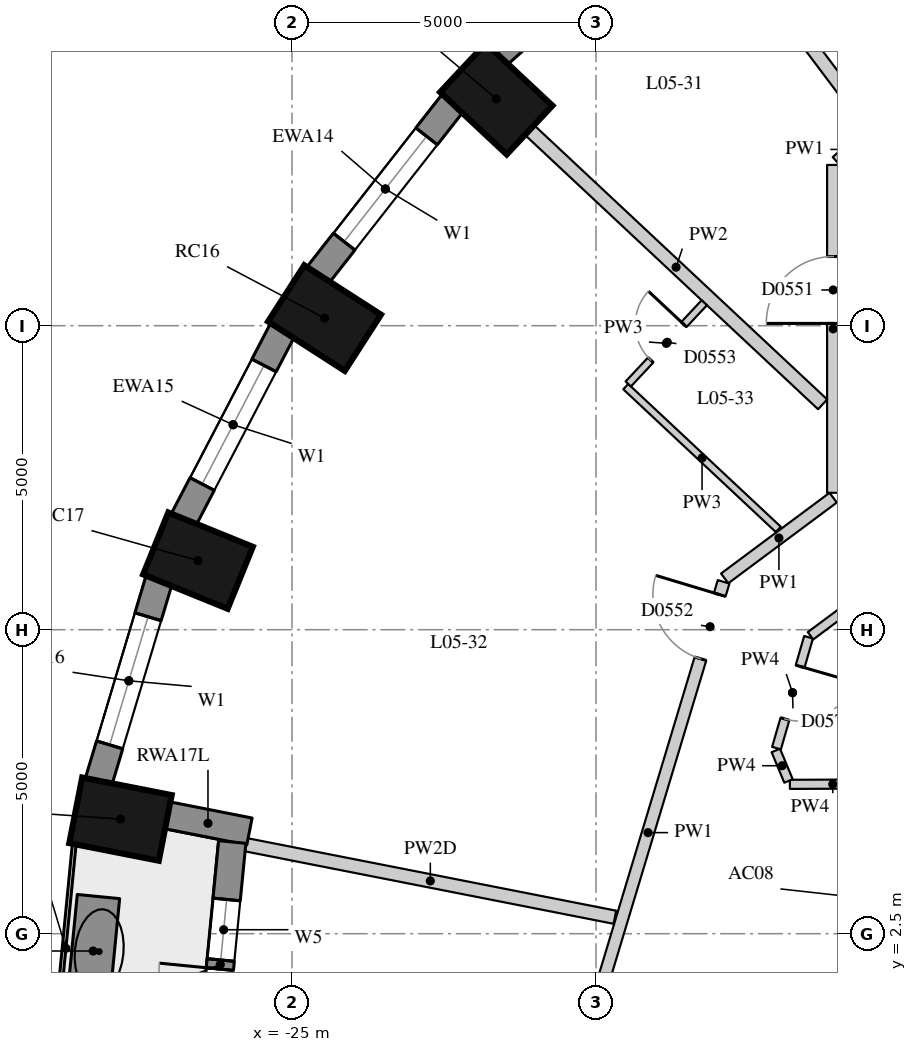
"""IFC4 building model, lengths in metres.
Left out: names, types, materials, properties, quantities, classifications, styles, units other than length and angle.
Written with IfcOpenShell. Run it as: python <this file> out.ifc"""

import sys

from ifc_helpers import new_model, si_unit, direction, frame, frame_2d, origin, origin_2d, place, context, subcontext, project, spatial, rectangle, extrude, element, fill, save


model = new_model("IFC4")
c1 = context("Model", 3, precision=1e-05, world=origin(), true_north=direction((0.0, 1.0)))
c2 = subcontext(c1, "Body", "Model", "MODEL_VIEW")
j1 = project(units=[si_unit("LENGTHUNIT", "METRE"), si_unit("PLANEANGLEUNIT", "RADIAN")], contexts=[c1])
p1 = place(None, origin())
s1 = spatial("IfcSite", under=j1, at=p1, CompositionType="ELEMENT")
p2 = place(p1, origin())
s2 = spatial("IfcBuilding", under=s1, at=p2, CompositionType="ELEMENT")
p3 = place(p2, frame((0.0, 0.0, 25.0)))
s3 = spatial("IfcBuildingStorey", under=s2, at=p3, CompositionType="ELEMENT", Elevation=25.0)
for number, where, z_axis, x_axis in (
    (1, (-21.641, 16.23, 0.0), (0.0, 0.0, 1.0), (-0.73, 0.683, 0.0)),
    (2, (-24.465, 12.625, 0.0), (0.0, 0.0, 1.0), (-0.841, 0.541, 0.0)),
    (3, (-26.546, 8.636, 0.0), (0.0, 0.0, 1.0), (-0.927, 0.376, 0.0)),
    (4, (-27.821, 4.385, 0.0), (0.0, 0.0, 1.0), (-0.981, 0.193, 0.0)),
):
    element("IfcColumn", number, at=place(p3, frame(where, z_axis=z_axis, x_axis=x_axis)), inside=s3, PredefinedType="COLUMN", context=c2, shape_type="SweptSolid", body=[
        extrude(rectangle(XDim=1.5, YDim=1.1, at=origin_2d()), origin(), (0.0, 0.0, 1.0), 3.3),
    ])
p4 = place(p3, frame((-18.871, 19.407, 0.0), z_axis=(0.0, 0.0, 1.0), x_axis=(-0.745526233716, -0.66647628228, 0.0)))
e5 = element("IfcWall", 5, at=p4, inside=s3, PredefinedType="SOLIDWALL", context=c2, shape_type="SweptSolid", body=[
    extrude(rectangle(XDim=3.697, YDim=0.45, at=frame_2d((1.848, 0.0))), origin(), (0.0, 0.0, 1.0), 3.02),
])
p5 = place(p4, frame((0.749, 0.0, 0.4)))
e6 = element("IfcOpeningElement", 6, at=p5, cuts=e5, PredefinedType="OPENING", context=c2, shape_type="SweptSolid", body=[
    extrude(rectangle(XDim=2.2, YDim=1.75, at=frame_2d((1.1, 0.875))), frame((0.0, 0.235, 0.0), z_axis=(0.0, -1.0, 0.0), x_axis=(1.0, 0.0, 0.0)), (0.0, 0.0, 1.0), 0.47),
])
p6 = place(p3, frame((-22.352, 16.17, 0.0), z_axis=(0.0, 0.0, 1.0), x_axis=(-0.616661975264, -0.787228053529, 0.0)))
e7 = element("IfcWall", 7, at=p6, inside=s3, PredefinedType="SOLIDWALL", context=c2, shape_type="SweptSolid", body=[
    extrude(rectangle(XDim=3.61, YDim=0.45, at=frame_2d((1.805, 0.0))), origin(), (0.0, 0.0, 1.0), 3.02),
])
p7 = place(p6, frame((0.705, 0.0, 0.4)))
e8 = element("IfcOpeningElement", 8, at=p7, cuts=e7, PredefinedType="OPENING", context=c2, shape_type="SweptSolid", body=[
    extrude(rectangle(XDim=2.2, YDim=1.75, at=frame_2d((1.1, 0.875))), frame((0.0, 0.235, 0.0), z_axis=(0.0, -1.0, 0.0), x_axis=(1.0, 0.0, 0.0)), (0.0, 0.0, 1.0), 0.47),
])
p8 = place(p3, frame((-25.152, 12.437, 0.0), z_axis=(0.0, 0.0, 1.0), x_axis=(-0.462492775226, -0.886623050041, 0.0)))
e9 = element("IfcWall", 9, at=p8, inside=s3, PredefinedType="SOLIDWALL", context=c2, shape_type="SweptSolid", body=[
    extrude(rectangle(XDim=3.532, YDim=0.45, at=frame_2d((1.766, 0.0))), origin(), (0.0, 0.0, 1.0), 3.02),
])
p9 = place(p8, frame((0.666, 0.0, 0.4)))
e10 = element("IfcOpeningElement", 10, at=p9, cuts=e9, PredefinedType="OPENING", context=c2, shape_type="SweptSolid", body=[
    extrude(rectangle(XDim=2.2, YDim=1.75, at=frame_2d((1.1, 0.875))), frame((0.0, 0.235, 0.0), z_axis=(0.0, -1.0, 0.0), x_axis=(1.0, 0.0, 0.0)), (0.0, 0.0, 1.0), 0.47),
])
p10 = place(p3, frame((-27.185, 8.323, 0.0), z_axis=(0.0, 0.0, 1.0), x_axis=(-0.287064133733, -0.957911364963, 0.0)))
e11 = element("IfcWall", 11, at=p10, inside=s3, PredefinedType="SOLIDWALL", context=c2, shape_type="SweptSolid", body=[
    extrude(rectangle(XDim=3.473, YDim=0.45, at=frame_2d((1.737, 0.0))), origin(), (0.0, 0.0, 1.0), 3.02),
])
p11 = place(p10, frame((0.637, 0.0, 0.4)))
e12 = element("IfcOpeningElement", 12, at=p11, cuts=e11, PredefinedType="OPENING", context=c2, shape_type="SweptSolid", body=[
    extrude(rectangle(XDim=2.2, YDim=1.75, at=frame_2d((1.1, 0.875))), frame((0.0, 0.235, 0.0), z_axis=(0.0, -1.0, 0.0), x_axis=(1.0, 0.0, 0.0)), (0.0, 0.0, 1.0), 0.47),
])
p12 = place(p3, frame((-27.064, 4.45, 0.0), z_axis=(0.0, 0.0, 1.0), x_axis=(0.98123042829, -0.192838913596, 0.0)))
e13 = element("IfcWall", 13, at=p12, inside=s3, PredefinedType="SOLIDWALL", context=c2, shape_type="SweptSolid", body=[
    extrude(rectangle(XDim=1.39, YDim=0.45, at=frame_2d((0.695, 0.0))), origin(), (0.0, 0.0, 1.0), 2.47),
])
p13 = place(p3, frame((-25.983, 4.008, 0.0), z_axis=(0.0, 0.0, 1.0), x_axis=(-0.097133468736, -0.995271364629, 0.0)))
e14 = element("IfcWall", 14, at=p13, inside=s3, PredefinedType="SOLIDWALL", context=c2, shape_type="SweptSolid", body=[
    extrude(rectangle(XDim=4.049, YDim=0.45, at=frame_2d((2.024, 0.0))), origin(), (0.0, 0.0, 1.0), 3.02),
])
p14 = place(p13, frame((0.949, 0.0, 0.4)))
e15 = element("IfcOpeningElement", 15, at=p14, cuts=e14, PredefinedType="OPENING", context=c2, shape_type="SweptSolid", body=[
    extrude(rectangle(XDim=1.0, YDim=1.75, at=frame_2d((0.5, 0.875))), frame((0.0, 0.235, 0.0), z_axis=(0.0, -1.0, 0.0), x_axis=(1.0, 0.0, 0.0)), (0.0, 0.0, 1.0), 0.47),
])
p15 = place(p13, frame((2.1, 0.0, 0.0)))
e16 = element("IfcOpeningElement", 16, at=p15, cuts=e14, PredefinedType="OPENING", context=c2, shape_type="SweptSolid", body=[
    extrude(rectangle(XDim=1.0, YDim=2.15, at=frame_2d((0.5, 1.075))), frame((0.0, 0.235, 0.0), z_axis=(0.0, -1.0, 0.0), x_axis=(1.0, 0.0, 0.0)), (0.0, 0.0, 1.0), 0.47),
])
p16 = place(p3, frame((-28.183, 3.111, 0.0), z_axis=(0.0, 0.0, 1.0), x_axis=(-0.097381768628, -0.995247100543, 0.0)))
e17 = element("IfcWall", 17, at=p16, inside=s3, PredefinedType="USERDEFINED", context=c2, shape_type="SweptSolid", body=[
    extrude(rectangle(XDim=1.8, YDim=0.7, at=frame_2d((0.9, 0.0))), origin(), (0.0, 0.0, 1.0), 0.75),
])
p17 = place(p3, frame((-17.884, 8.344, 0.0), z_axis=(0.0, 0.0, 1.0), x_axis=(0.802260120548, 0.596974621721, 0.0)))
e18 = element("IfcWall", 18, at=p17, inside=s3, PredefinedType="PARTITIONING", context=c2, shape_type="SweptSolid", body=[
    extrude(rectangle(XDim=2.224, YDim=0.2, at=frame_2d((1.112, 0.0))), origin(), (0.0, 0.0, 1.0), 3.02),
])
p18 = place(p3, frame((-16.1, 9.751, 0.0), z_axis=(0.0, 0.0, 1.0), x_axis=(0.0, 1.0, 0.0)))
e19 = element("IfcWall", 19, at=p18, inside=s3, PredefinedType="PARTITIONING", context=c2, shape_type="SweptSolid", body=[
    extrude(rectangle(XDim=5.393, YDim=0.2, at=frame_2d((2.696, 0.0))), origin(), (0.0, 0.0, 1.0), 3.02),
])
p19 = place(p18, frame((2.786, 0.0, 0.0)))
e20 = element("IfcOpeningElement", 20, at=p19, cuts=e19, PredefinedType="OPENING", context=c2, shape_type="SweptSolid", body=[
    extrude(rectangle(XDim=1.1, YDim=2.1, at=frame_2d((0.55, 1.05))), frame((0.0, 0.11, 0.0), z_axis=(0.0, -1.0, 0.0), x_axis=(1.0, 0.0, 0.0)), (0.0, 0.0, 1.0), 0.22),
])
p20 = place(p3, frame((-16.041, 15.198, 0.0), z_axis=(0.0, 0.0, 1.0), x_axis=(0.744722115519, 0.667374685359, 0.0)))
e21 = element("IfcWall", 21, at=p20, inside=s3, PredefinedType="PARTITIONING", context=c2, shape_type="SweptSolid", body=[
    extrude(rectangle(XDim=0.603, YDim=0.2, at=frame_2d((0.301, 0.0))), origin(), (0.0, 0.0, 1.0), 3.02),
])
p21 = place(p3, frame((-20.388, 0.038, 0.0), z_axis=(0.0, 0.0, 1.0), x_axis=(0.288600779805, 0.957449523419, 0.0)))
e22 = element("IfcWall", 22, at=p21, inside=s3, PredefinedType="PARTITIONING", context=c2, shape_type="SweptSolid", body=[
    extrude(rectangle(XDim=8.615, YDim=0.2, at=frame_2d((4.308, 0.0))), origin(), (0.0, 0.0, 1.0), 3.02),
])
p22 = place(p21, frame((7.295, 0.0, 0.0)))
e23 = element("IfcOpeningElement", 23, at=p22, cuts=e22, PredefinedType="OPENING", context=c2, shape_type="SweptSolid", body=[
    extrude(rectangle(XDim=1.1, YDim=2.1, at=frame_2d((0.55, 1.05))), frame((0.0, 0.11, 0.0), z_axis=(0.0, -1.0, 0.0), x_axis=(1.0, 0.0, 0.0)), (0.0, 0.0, 1.0), 0.22),
])
p23 = place(p21, frame((0.22, 0.0, 0.0)))
e24 = element("IfcOpeningElement", 24, at=p23, cuts=e22, PredefinedType="OPENING", context=c2, shape_type="SweptSolid", body=[
    extrude(rectangle(XDim=1.1, YDim=2.1, at=frame_2d((0.55, 1.05))), frame((0.0, 0.11, 0.0), z_axis=(0.0, -1.0, 0.0), x_axis=(1.0, 0.0, 0.0)), (0.0, 0.0, 1.0), 0.22),
])
p24 = place(p3, frame((-15.402, 4.961, 0.0), z_axis=(0.0, 0.0, 1.0), x_axis=(-0.999994001087, -0.003463782477, 0.0)))
e25 = element("IfcWall", 25, at=p24, inside=s3, PredefinedType="PARTITIONING", context=c2, shape_type="SweptSolid", body=[
    extrude(rectangle(XDim=1.41, YDim=0.15, at=frame_2d((0.705, 0.0))), origin(), (0.0, 0.0, 1.0), 3.02),
])
p25 = place(p3, frame((-16.834, 5.012, 0.0), z_axis=(0.0, 0.0, 1.0), x_axis=(-0.384455737739, 0.923143426408, 0.0)))
e26 = element("IfcWall", 26, at=p25, inside=s3, PredefinedType="PARTITIONING", context=c2, shape_type="SweptSolid", body=[
    extrude(rectangle(XDim=0.543, YDim=0.15, at=frame_2d((0.271, 0.0))), origin(), (0.0, 0.0, 1.0), 3.02),
])
p26 = place(p3, frame((-17.032, 5.552, 0.0), z_axis=(0.0, 0.0, 1.0), x_axis=(0.277658349549, 0.96067988473, 0.0)))
e27 = element("IfcWall", 27, at=p26, inside=s3, PredefinedType="PARTITIONING", context=c2, shape_type="SweptSolid", body=[
    extrude(rectangle(XDim=1.898, YDim=0.15, at=frame_2d((0.949, 0.0))), origin(), (0.0, 0.0, 1.0), 3.02),
])
p27 = place(p26, frame((0.499, 0.0, 0.0)))
e28 = element("IfcOpeningElement", 28, at=p27, cuts=e27, PredefinedType="OPENING", context=c2, shape_type="SweptSolid", body=[
    extrude(rectangle(XDim=0.9, YDim=2.1, at=frame_2d((0.45, 1.05))), frame((0.0, 0.085, 0.0), z_axis=(0.0, -1.0, 0.0), x_axis=(1.0, 0.0, 0.0)), (0.0, 0.0, 1.0), 0.17),
])
p28 = place(p3, frame((-16.473, 7.4, 0.0), z_axis=(0.0, 0.0, 1.0), x_axis=(0.802267063429, 0.596965291233, 0.0)))
e29 = element("IfcWall", 29, at=p28, inside=s3, PredefinedType="PARTITIONING", context=c2, shape_type="SweptSolid", body=[
    extrude(rectangle(XDim=2.41, YDim=0.15, at=frame_2d((1.205, 0.0))), origin(), (0.0, 0.0, 1.0), 3.02),
])
p29 = place(p3, frame((-17.708, 18.743, 0.0), z_axis=(0.0, 0.0, 1.0), x_axis=(0.601172757903, -0.799119086967, 0.0)))
e30 = element("IfcWall", 30, at=p29, inside=s3, PredefinedType="PARTITIONING", context=c2, shape_type="SweptSolid", body=[
    extrude(rectangle(XDim=3.729, YDim=0.22, at=frame_2d((1.864, 0.0))), origin(), (0.0, 0.0, 1.0), 2.57),
])
p30 = place(p3, frame((-21.093, 15.718, 0.0), z_axis=(0.0, 0.0, 1.0), x_axis=(0.73009284205, -0.683347965525, 0.0)))
e31 = element("IfcWall", 31, at=p30, inside=s3, PredefinedType="PARTITIONING", context=c2, shape_type="SweptSolid", body=[
    extrude(rectangle(XDim=6.602, YDim=0.22, at=frame_2d((3.301, 0.0))), origin(), (0.0, 0.0, 1.0), 3.02),
])
p31 = place(p3, frame((-25.761, 3.964, 0.0), z_axis=(0.0, 0.0, 1.0), x_axis=(0.981209888948, -0.192943395406, 0.0)))
e32 = element("IfcWall", 32, at=p31, inside=s3, PredefinedType="PARTITIONING", context=c2, shape_type="SweptSolid", body=[
    extrude(rectangle(XDim=6.188, YDim=0.22, at=frame_2d((3.094, 0.0))), origin(), (0.0, 0.0, 1.0), 2.47),
])
p32 = place(p3, frame((-17.002, 9.149, 0.0), z_axis=(0.0, 0.0, 1.0), x_axis=(-0.730093035944, 0.683347758368, 0.0)))
e33 = element("IfcWall", 33, at=p32, inside=s3, PredefinedType="PARTITIONING", context=c2, shape_type="SweptSolid", body=[
    extrude(rectangle(XDim=3.437, YDim=0.12, at=frame_2d((1.718, 0.0))), origin(), (0.0, 0.0, 1.0), 3.02),
])
p33 = place(p3, frame((-19.47, 11.542, 0.0), z_axis=(0.0, 0.0, 1.0), x_axis=(0.683306289544, 0.730131847456, 0.0)))
e34 = element("IfcWall", 34, at=p33, inside=s3, PredefinedType="PARTITIONING", context=c2, shape_type="SweptSolid", body=[
    extrude(rectangle(XDim=1.83, YDim=0.12, at=frame_2d((0.915, 0.0))), origin(), (0.0, 0.0, 1.0), 3.02),
])
p34 = place(p33, frame((0.54, 0.0, 0.0)))
e35 = element("IfcOpeningElement", 35, at=p34, cuts=e34, PredefinedType="OPENING", context=c2, shape_type="SweptSolid", body=[
    extrude(rectangle(XDim=0.8, YDim=2.1, at=frame_2d((0.4, 1.05))), frame((0.0, 0.07, 0.0), z_axis=(0.0, -1.0, 0.0), x_axis=(1.0, 0.0, 0.0)), (0.0, 0.0, 1.0), 0.14),
])
p35 = place(p7, origin())
e36 = element("IfcWindow", 36, at=p35, inside=s3, PartitioningType="SINGLE_PANEL", PredefinedType="WINDOW", context=c2, shape_type="SweptSolid", body=[
    extrude(rectangle(XDim=2.2, YDim=1.75, at=frame_2d((1.1, 0.875))), frame((0.0, 0.035, 0.0), z_axis=(0.0, -1.0, 0.0), x_axis=(1.0, 0.0, 0.0)), (0.0, 0.0, 1.0), 0.06),
])
fill(e8, e36)
p36 = place(p9, origin())
e37 = element("IfcWindow", 37, at=p36, inside=s3, PartitioningType="SINGLE_PANEL", PredefinedType="WINDOW", context=c2, shape_type="SweptSolid", body=[
    extrude(rectangle(XDim=2.2, YDim=1.75, at=frame_2d((1.1, 0.875))), frame((0.0, 0.035, 0.0), z_axis=(0.0, -1.0, 0.0), x_axis=(1.0, 0.0, 0.0)), (0.0, 0.0, 1.0), 0.06),
])
fill(e10, e37)
p37 = place(p11, origin())
e38 = element("IfcWindow", 38, at=p37, inside=s3, PartitioningType="SINGLE_PANEL", PredefinedType="WINDOW", context=c2, shape_type="SweptSolid", body=[
    extrude(rectangle(XDim=2.2, YDim=1.75, at=frame_2d((1.1, 0.875))), frame((0.0, 0.035, 0.0), z_axis=(0.0, -1.0, 0.0), x_axis=(1.0, 0.0, 0.0)), (0.0, 0.0, 1.0), 0.06),
])
fill(e12, e38)
p38 = place(p14, origin())
e39 = element("IfcWindow", 39, at=p38, inside=s3, PartitioningType="SINGLE_PANEL", PredefinedType="WINDOW", context=c2, shape_type="SweptSolid", body=[
    extrude(rectangle(XDim=1.0, YDim=1.75, at=frame_2d((0.5, 0.875))), frame((0.0, 0.035, 0.0), z_axis=(0.0, -1.0, 0.0), x_axis=(1.0, 0.0, 0.0)), (0.0, 0.0, 1.0), 0.06),
])
fill(e15, e39)
p39 = place(p15, frame((1.0, 0.0, 0.0), z_axis=(0.0, 0.0, 1.0), x_axis=(-1.0, 0.0, 0.0)))
e40 = element("IfcDoor", 40, at=p39, inside=s3, OperationType="SINGLE_SWING_RIGHT", PredefinedType="DOOR", context=c2, shape_type="SweptSolid", body=[
    extrude(rectangle(XDim=1.0, YDim=2.15, at=frame_2d((0.5, 1.075))), frame((0.0, 0.075, 0.0), z_axis=(0.0, -1.0, 0.0), x_axis=(1.0, 0.0, 0.0)), (0.0, 0.0, 1.0), 0.05),
])
fill(e16, e40)
p40 = place(p19, origin())
e41 = element("IfcDoor", 41, at=p40, inside=s3, OperationType="SINGLE_SWING_LEFT", PredefinedType="DOOR", context=c2, shape_type="SweptSolid", body=[
    extrude(rectangle(XDim=1.1, YDim=2.1, at=frame_2d((0.55, 1.05))), frame((0.0, 0.025, 0.0), z_axis=(0.0, -1.0, 0.0), x_axis=(1.0, 0.0, 0.0)), (0.0, 0.0, 1.0), 0.05),
])
fill(e20, e41)
p41 = place(p22, origin())
e42 = element("IfcDoor", 42, at=p41, inside=s3, OperationType="SINGLE_SWING_RIGHT", PredefinedType="DOOR", context=c2, shape_type="SweptSolid", body=[
    extrude(rectangle(XDim=1.1, YDim=2.1, at=frame_2d((0.55, 1.05))), frame((0.0, 0.025, 0.0), z_axis=(0.0, -1.0, 0.0), x_axis=(1.0, 0.0, 0.0)), (0.0, 0.0, 1.0), 0.05),
])
fill(e23, e42)
p42 = place(p34, origin())
e43 = element("IfcDoor", 43, at=p42, inside=s3, OperationType="SINGLE_SWING_RIGHT", PredefinedType="DOOR", context=c2, shape_type="SweptSolid", body=[
    extrude(rectangle(XDim=0.8, YDim=2.1, at=frame_2d((0.4, 1.05))), frame((0.0, 0.025, 0.0), z_axis=(0.0, -1.0, 0.0), x_axis=(1.0, 0.0, 0.0)), (0.0, 0.0, 1.0), 0.05),
])
fill(e35, e43)
p43 = place(p27, origin())
e44 = element("IfcDoor", 44, at=p43, inside=s3, OperationType="SINGLE_SWING_LEFT", PredefinedType="DOOR", context=c2, shape_type="SweptSolid", body=[
    extrude(rectangle(XDim=0.9, YDim=2.1, at=frame_2d((0.45, 1.05))), frame((0.0, 0.025, 0.0), z_axis=(0.0, -1.0, 0.0), x_axis=(1.0, 0.0, 0.0)), (0.0, 0.0, 1.0), 0.05),
])
fill(e28, e44)
save(model, sys.argv[1])
